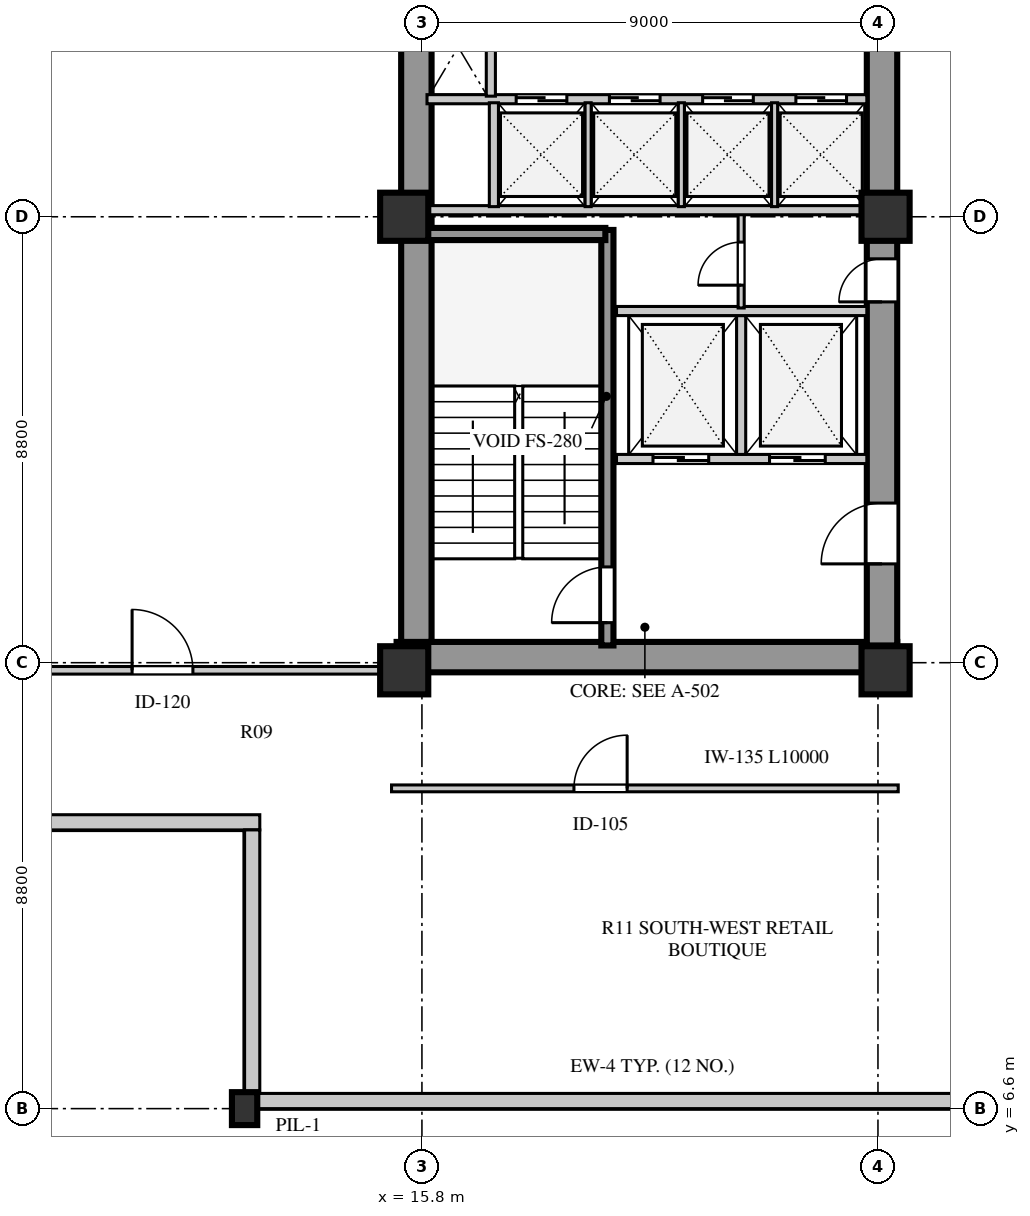
"""IFC4 building model, lengths in metres.
Left out: names, types, materials, properties, quantities, classifications, styles, units other than length and angle.
Written with IfcOpenShell. Run it as: python <this file> out.ifc"""

import sys

from ifc_helpers import new_model, si_unit, direction, frame, frame_2d, origin, origin_2d, place, context, subcontext, project, spatial, rectangle, extrude, element, fill, save


model = new_model("IFC4")
c1 = context("Model", 3, precision=1e-05, world=origin(), true_north=direction((0.0, 1.0)))
c2 = subcontext(c1, "Body", "Model", "MODEL_VIEW")
j1 = project(units=[si_unit("LENGTHUNIT", "METRE"), si_unit("PLANEANGLEUNIT", "RADIAN")], contexts=[c1])
p1 = place(None, origin())
s1 = spatial("IfcSite", under=j1, at=p1, CompositionType="ELEMENT")
p2 = place(p1, origin())
s2 = spatial("IfcBuilding", under=s1, at=p2, CompositionType="ELEMENT")
p3 = place(p2, frame((0.0, 0.0, 8.0)))
s3 = spatial("IfcBuildingStorey", under=s2, at=p3, CompositionType="ELEMENT", Elevation=8.0)
p4 = place(p3, frame((15.3, 15.51, 0.0), z_axis=(0.0, 0.0, 1.0), x_axis=(1.0, 0.0, 0.0)))
e1 = element("IfcWall", 1, at=p4, inside=s3, PredefinedType="SHEAR", context=c2, shape_type="SweptSolid", body=[
    extrude(rectangle(XDim=9.88, YDim=0.6, at=frame_2d((4.94, 0.0))), origin(), (0.0, 0.0, 1.0), 4.22),
])
p5 = place(p3, frame((15.69, 15.81, 0.0), z_axis=(0.0, 0.0, 1.0), x_axis=(0.0, 1.0, 0.0)))
e2 = element("IfcWall", 2, at=p5, inside=s3, PredefinedType="SHEAR", context=c2, shape_type="SweptSolid", body=[
    extrude(rectangle(XDim=25.63, YDim=0.6, at=frame_2d((12.815, 0.0))), origin(), (0.0, 0.0, 1.0), 4.22),
])
p6 = place(p3, frame((24.88, 15.74, 0.0), z_axis=(0.0, 0.0, 1.0), x_axis=(0.0, 1.0, 0.0)))
e3 = element("IfcWall", 3, at=p6, inside=s3, PredefinedType="SHEAR", context=c2, shape_type="SweptSolid", body=[
    extrude(rectangle(XDim=25.76, YDim=0.6, at=frame_2d((12.88, 0.0))), origin(), (0.0, 0.0, 1.0), 4.22),
])
p7 = place(p6, frame((1.61, 0.0, 0.0)))
e4 = element("IfcOpeningElement", 4, at=p7, cuts=e3, PredefinedType="OPENING", context=c2, shape_type="SweptSolid", body=[
    extrude(rectangle(XDim=1.2, YDim=2.1, at=frame_2d((0.6, 1.05))), frame((0.0, 0.31, 0.0), z_axis=(0.0, -1.0, 0.0), x_axis=(1.0, 0.0, 0.0)), (0.0, 0.0, 1.0), 0.62),
])
p8 = place(p6, frame((6.78, 0.0, 0.0)))
e5 = element("IfcOpeningElement", 5, at=p8, cuts=e3, PredefinedType="OPENING", context=c2, shape_type="SweptSolid", body=[
    extrude(rectangle(XDim=0.85, YDim=2.06, at=frame_2d((0.425, 1.03))), frame((0.0, 0.31, 0.0), z_axis=(0.0, -1.0, 0.0), x_axis=(1.0, 0.0, 0.0)), (0.0, 0.0, 1.0), 0.62),
])
p9 = place(p6, frame((12.11, 0.0, 0.0)))
e6 = element("IfcOpeningElement", 6, at=p9, cuts=e3, PredefinedType="OPENING", context=c2, shape_type="SweptSolid", body=[
    extrude(rectangle(XDim=1.5, YDim=2.12, at=frame_2d((0.75, 1.06))), frame((0.0, 0.31, 0.0), z_axis=(0.0, -1.0, 0.0), x_axis=(1.0, 0.0, 0.0)), (0.0, 0.0, 1.0), 0.62),
])
p10 = place(p6, frame((20.11, 0.0, 0.0)))
e7 = element("IfcOpeningElement", 7, at=p10, cuts=e3, PredefinedType="OPENING", context=c2, shape_type="SweptSolid", body=[
    extrude(rectangle(XDim=1.2, YDim=2.12, at=frame_2d((0.6, 1.06))), frame((0.0, 0.31, 0.0), z_axis=(0.0, -1.0, 0.0), x_axis=(1.0, 0.0, 0.0)), (0.0, 0.0, 1.0), 0.62),
])
p11 = place(p6, frame((24.01, 0.0, 0.0)))
e8 = element("IfcOpeningElement", 8, at=p11, cuts=e3, PredefinedType="OPENING", context=c2, shape_type="SweptSolid", body=[
    extrude(rectangle(XDim=0.95, YDim=2.1, at=frame_2d((0.475, 1.05))), frame((0.0, 0.31, 0.0), z_axis=(0.0, -1.0, 0.0), x_axis=(1.0, 0.0, 0.0)), (0.0, 0.0, 1.0), 0.62),
])
for number, where, z_axis, x_axis in (
    (9, (15.45, 15.25, 0.0), (0.0, 0.0, 1.0), (1.0, 0.0, 0.0)),
    (10, (15.45, 24.2, 0.0), (0.0, 0.0, 1.0), (1.0, 0.0, 0.0)),
    (11, (24.95, 15.25, 0.0), (0.0, 0.0, 1.0), (1.0, 0.0, 0.0)),
    (12, (24.95, 24.2, 0.0), (0.0, 0.0, 1.0), (1.0, 0.0, 0.0)),
):
    element("IfcColumn", number, at=place(p3, frame(where, z_axis=z_axis, x_axis=x_axis)), inside=s3, PredefinedType="COLUMN", context=c2, shape_type="SweptSolid", body=[
        extrude(rectangle(XDim=0.95, YDim=0.95, at=origin_2d()), origin(), (0.0, 0.0, 1.0), 4.22),
    ])
p12 = place(p3, frame((12.3, 6.6, 0.0), z_axis=(0.0, 0.0, 1.0), x_axis=(1.0, 0.0, 0.0)))
e13 = element("IfcColumn", 13, at=p12, inside=s3, PredefinedType="PILASTER", context=c2, shape_type="SweptSolid", body=[
    extrude(rectangle(XDim=0.5, YDim=0.65, at=origin_2d()), origin(), (0.0, 0.0, 1.0), 4.22),
])
p13 = place(p3, frame((12.3, 6.75, 0.0), z_axis=(0.0, 0.0, 1.0), x_axis=(1.0, 0.0, 0.0)))
e14 = element("IfcWall", 14, at=p13, inside=s3, PredefinedType="STANDARD", context=c2, shape_type="SweptSolid", body=[
    extrude(rectangle(XDim=34.0, YDim=0.3, at=frame_2d((17.0, 0.0))), origin(), (0.0, 0.0, 1.0), 4.22),
])
p14 = place(p13, frame((16.25, 0.0, 0.8)))
e15 = element("IfcOpeningElement", 15, at=p14, cuts=e14, PredefinedType="OPENING", context=c2, shape_type="SweptSolid", body=[
    extrude(rectangle(XDim=1.5, YDim=2.0, at=frame_2d((0.75, 1.0))), frame((0.0, 0.16, 0.0), z_axis=(0.0, -1.0, 0.0), x_axis=(1.0, 0.0, 0.0)), (0.0, 0.0, 1.0), 0.32),
])
p15 = place(p3, frame((6.8, 12.25, 0.0), z_axis=(0.0, 0.0, 1.0), x_axis=(1.0, 0.0, 0.0)))
e16 = element("IfcWall", 16, at=p15, inside=s3, PredefinedType="STANDARD", context=c2, shape_type="SweptSolid", body=[
    extrude(rectangle(XDim=5.8, YDim=0.3, at=frame_2d((2.9, 0.0))), origin(), (0.0, 0.0, 1.0), 4.22),
])
p16 = place(p3, frame((12.45, 12.1, 0.0), z_axis=(0.0, 0.0, 1.0), x_axis=(0.0, -1.0, 0.0)))
e17 = element("IfcWall", 17, at=p16, inside=s3, PredefinedType="STANDARD", context=c2, shape_type="SweptSolid", body=[
    extrude(rectangle(XDim=5.2, YDim=0.3, at=frame_2d((2.6, 0.0))), origin(), (0.0, 0.0, 1.0), 4.22),
])
p17 = place(p3, frame((19.46, 15.74, 0.0), z_axis=(0.0, 0.0, 1.0), x_axis=(0.0, 1.0, 0.0)))
e18 = element("IfcWall", 18, at=p17, inside=s3, PredefinedType="SHEAR", context=c2, shape_type="SweptSolid", body=[
    extrude(rectangle(XDim=8.2, YDim=0.24, at=frame_2d((4.1, 0.0))), origin(), (0.0, 0.0, 1.0), 4.5),
])
p18 = place(p17, frame((0.45, 0.0, 0.0)))
e19 = element("IfcOpeningElement", 19, at=p18, cuts=e18, PredefinedType="OPENING", context=c2, shape_type="SweptSolid", body=[
    extrude(rectangle(XDim=1.1, YDim=2.1, at=frame_2d((0.55, 1.05))), frame((0.0, 0.13, 0.0), z_axis=(0.0, -1.0, 0.0), x_axis=(1.0, 0.0, 0.0)), (0.0, 0.0, 1.0), 0.26),
])
p19 = place(p3, frame((15.9, 23.86, 0.0), z_axis=(0.0, 0.0, 1.0), x_axis=(1.0, 0.0, 0.0)))
e20 = element("IfcWall", 20, at=p19, inside=s3, PredefinedType="SHEAR", context=c2, shape_type="SweptSolid", body=[
    extrude(rectangle(XDim=3.52, YDim=0.24, at=frame_2d((1.76, 0.0))), origin(), (0.0, 0.0, 1.0), 4.5),
])
p20 = place(p3, frame((19.64, 19.42, 0.0), z_axis=(0.0, 0.0, 1.0), x_axis=(1.0, 0.0, 0.0)))
e21 = element("IfcWall", 21, at=p20, inside=s3, PredefinedType="SOLIDWALL", context=c2, shape_type="SweptSolid", body=[
    extrude(rectangle(XDim=4.94, YDim=0.18, at=frame_2d((2.47, 0.0))), origin(), (0.0, 0.0, 1.0), 4.22),
])
p21 = place(p20, frame((0.72, 0.0, 0.0)))
e22 = element("IfcOpeningElement", 22, at=p21, cuts=e21, PredefinedType="OPENING", context=c2, shape_type="SweptSolid", body=[
    extrude(rectangle(XDim=1.1, YDim=2.1, at=frame_2d((0.55, 1.05))), frame((0.0, 0.1, 0.0), z_axis=(0.0, -1.0, 0.0), x_axis=(1.0, 0.0, 0.0)), (0.0, 0.0, 1.0), 0.2),
])
p22 = place(p20, frame((3.02, 0.0, 0.0)))
e23 = element("IfcOpeningElement", 23, at=p22, cuts=e21, PredefinedType="OPENING", context=c2, shape_type="SweptSolid", body=[
    extrude(rectangle(XDim=1.1, YDim=2.1, at=frame_2d((0.55, 1.05))), frame((0.0, 0.1, 0.0), z_axis=(0.0, -1.0, 0.0), x_axis=(1.0, 0.0, 0.0)), (0.0, 0.0, 1.0), 0.2),
])
p23 = place(p3, frame((22.1, 19.51, 0.0), z_axis=(0.0, 0.0, 1.0), x_axis=(0.0, 1.0, 0.0)))
e24 = element("IfcWall", 24, at=p23, inside=s3, PredefinedType="SOLIDWALL", context=c2, shape_type="SweptSolid", body=[
    extrude(rectangle(XDim=2.74, YDim=0.18, at=frame_2d((1.37, 0.0))), origin(), (0.0, 0.0, 1.0), 4.22),
])
p24 = place(p3, frame((19.64, 22.34, 0.0), z_axis=(0.0, 0.0, 1.0), x_axis=(1.0, 0.0, 0.0)))
e25 = element("IfcWall", 25, at=p24, inside=s3, PredefinedType="SOLIDWALL", context=c2, shape_type="SweptSolid", body=[
    extrude(rectangle(XDim=4.94, YDim=0.18, at=frame_2d((2.47, 0.0))), origin(), (0.0, 0.0, 1.0), 4.22),
])
p25 = place(p3, frame((22.1, 22.4, 0.0), z_axis=(0.0, 0.0, 1.0), x_axis=(0.0, 1.0, 0.0)))
e26 = element("IfcWall", 26, at=p25, inside=s3, PredefinedType="PARTITIONING", context=c2, shape_type="SweptSolid", body=[
    extrude(rectangle(XDim=1.88, YDim=0.12, at=frame_2d((0.94, 0.0))), origin(), (0.0, 0.0, 1.0), 4.22),
])
p26 = place(p25, frame((0.45, 0.0, 0.0)))
e27 = element("IfcOpeningElement", 27, at=p26, cuts=e26, PredefinedType="OPENING", context=c2, shape_type="SweptSolid", body=[
    extrude(rectangle(XDim=0.85, YDim=2.06, at=frame_2d((0.425, 1.03))), frame((0.0, 0.07, 0.0), z_axis=(0.0, -1.0, 0.0), x_axis=(1.0, 0.0, 0.0)), (0.0, 0.0, 1.0), 0.14),
])
p27 = place(p3, frame((15.9, 26.52, 0.0), z_axis=(0.0, 0.0, 1.0), x_axis=(1.0, 0.0, 0.0)))
e28 = element("IfcWall", 28, at=p27, inside=s3, PredefinedType="SOLIDWALL", context=c2, shape_type="SweptSolid", body=[
    extrude(rectangle(XDim=8.68, YDim=0.18, at=frame_2d((4.34, 0.0))), origin(), (0.0, 0.0, 1.0), 4.22),
])
p28 = place(p27, frame((1.76, 0.0, 0.0)))
e29 = element("IfcOpeningElement", 29, at=p28, cuts=e28, PredefinedType="OPENING", context=c2, shape_type="SweptSolid", body=[
    extrude(rectangle(XDim=1.0, YDim=2.1, at=frame_2d((0.5, 1.05))), frame((0.0, 0.1, 0.0), z_axis=(0.0, -1.0, 0.0), x_axis=(1.0, 0.0, 0.0)), (0.0, 0.0, 1.0), 0.2),
])
p29 = place(p27, frame((3.6, 0.0, 0.0)))
e30 = element("IfcOpeningElement", 30, at=p29, cuts=e28, PredefinedType="OPENING", context=c2, shape_type="SweptSolid", body=[
    extrude(rectangle(XDim=1.0, YDim=2.1, at=frame_2d((0.5, 1.05))), frame((0.0, 0.1, 0.0), z_axis=(0.0, -1.0, 0.0), x_axis=(1.0, 0.0, 0.0)), (0.0, 0.0, 1.0), 0.2),
])
p30 = place(p27, frame((5.44, 0.0, 0.0)))
e31 = element("IfcOpeningElement", 31, at=p30, cuts=e28, PredefinedType="OPENING", context=c2, shape_type="SweptSolid", body=[
    extrude(rectangle(XDim=1.0, YDim=2.1, at=frame_2d((0.5, 1.05))), frame((0.0, 0.1, 0.0), z_axis=(0.0, -1.0, 0.0), x_axis=(1.0, 0.0, 0.0)), (0.0, 0.0, 1.0), 0.2),
])
p31 = place(p27, frame((7.28, 0.0, 0.0)))
e32 = element("IfcOpeningElement", 32, at=p31, cuts=e28, PredefinedType="OPENING", context=c2, shape_type="SweptSolid", body=[
    extrude(rectangle(XDim=1.0, YDim=2.1, at=frame_2d((0.5, 1.05))), frame((0.0, 0.1, 0.0), z_axis=(0.0, -1.0, 0.0), x_axis=(1.0, 0.0, 0.0)), (0.0, 0.0, 1.0), 0.2),
])
p32 = place(p3, frame((15.9, 24.33, 0.0), z_axis=(0.0, 0.0, 1.0), x_axis=(1.0, 0.0, 0.0)))
e33 = element("IfcWall", 33, at=p32, inside=s3, PredefinedType="SOLIDWALL", context=c2, shape_type="SweptSolid", body=[
    extrude(rectangle(XDim=8.68, YDim=0.18, at=frame_2d((4.34, 0.0))), origin(), (0.0, 0.0, 1.0), 3.42),
])
p33 = place(p3, frame((17.22, 24.4, 0.0), z_axis=(0.0, 0.0, 1.0), x_axis=(0.0, 1.0, 0.0)))
e34 = element("IfcWall", 34, at=p33, inside=s3, PredefinedType="SOLIDWALL", context=c2, shape_type="SweptSolid", body=[
    extrude(rectangle(XDim=2.05, YDim=0.18, at=frame_2d((1.025, 0.0))), origin(), (0.0, 0.0, 1.0), 4.22),
])
for number, where, z_axis, x_axis in (
    (35, (19.08, 24.4, 0.0), (0.0, 0.0, 1.0), (0.0, 1.0, 0.0)),
    (36, (20.92, 24.4, 0.0), (0.0, 0.0, 1.0), (0.0, 1.0, 0.0)),
    (37, (22.76, 24.4, 0.0), (0.0, 0.0, 1.0), (0.0, 1.0, 0.0)),
):
    element("IfcWall", number, at=place(p3, frame(where, z_axis=z_axis, x_axis=x_axis)), inside=s3, PredefinedType="PARTITIONING", context=c2, shape_type="SweptSolid", body=[
        extrude(rectangle(XDim=2.05, YDim=0.12, at=frame_2d((1.025, 0.0))), origin(), (0.0, 0.0, 1.0), 4.22),
    ])
p34 = place(p3, frame((17.16, 26.58, 0.0), z_axis=(0.0, 0.0, 1.0), x_axis=(0.0, 1.0, 0.0)))
e38 = element("IfcWall", 38, at=p34, inside=s3, PredefinedType="SOLIDWALL", context=c2, shape_type="SweptSolid", body=[
    extrude(rectangle(XDim=4.02, YDim=0.18, at=frame_2d((2.01, 0.0))), origin(), (0.0, 0.0, 1.0), 4.22),
])
p35 = place(p34, frame((2.35, 0.0, 0.0)))
e39 = element("IfcOpeningElement", 39, at=p35, cuts=e38, PredefinedType="OPENING", context=c2, shape_type="SweptSolid", body=[
    extrude(rectangle(XDim=0.85, YDim=2.06, at=frame_2d((0.425, 1.03))), frame((0.0, 0.1, 0.0), z_axis=(0.0, -1.0, 0.0), x_axis=(1.0, 0.0, 0.0)), (0.0, 0.0, 1.0), 0.2),
])
p36 = place(p3, frame((6.88, 15.25, 0.0), z_axis=(0.0, 0.0, 1.0), x_axis=(1.0, 0.0, 0.0)))
e40 = element("IfcWall", 40, at=p36, inside=s3, PredefinedType="PARTITIONING", context=c2, shape_type="SweptSolid", body=[
    extrude(rectangle(XDim=8.32, YDim=0.15, at=frame_2d((4.16, 0.0))), origin(), (0.0, 0.0, 1.0), 3.72),
])
p37 = place(p36, frame((3.2, 0.0, 0.0)))
e41 = element("IfcOpeningElement", 41, at=p37, cuts=e40, PredefinedType="OPENING", context=c2, shape_type="SweptSolid", body=[
    extrude(rectangle(XDim=1.2, YDim=2.1, at=frame_2d((0.6, 1.05))), frame((0.0, 0.085, 0.0), z_axis=(0.0, -1.0, 0.0), x_axis=(1.0, 0.0, 0.0)), (0.0, 0.0, 1.0), 0.17),
])
p38 = place(p3, frame((15.2, 12.92, 0.0), z_axis=(0.0, 0.0, 1.0), x_axis=(1.0, 0.0, 0.0)))
e42 = element("IfcWall", 42, at=p38, inside=s3, PredefinedType="PARTITIONING", context=c2, shape_type="SweptSolid", body=[
    extrude(rectangle(XDim=10.0, YDim=0.135, at=frame_2d((5.0, 0.0))), origin(), (0.0, 0.0, 1.0), 4.22),
])
p39 = place(p38, frame((3.6, 0.0, 0.0)))
e43 = element("IfcOpeningElement", 43, at=p39, cuts=e42, PredefinedType="OPENING", context=c2, shape_type="SweptSolid", body=[
    extrude(rectangle(XDim=1.05, YDim=2.1, at=frame_2d((0.525, 1.05))), frame((0.0, 0.078, 0.0), z_axis=(0.0, -1.0, 0.0), x_axis=(1.0, 0.0, 0.0)), (0.0, 0.0, 1.0), 0.155),
])
p40 = place(p18, origin())
e44 = element("IfcDoor", 44, at=p40, inside=s3, OperationType="SINGLE_SWING_LEFT", PredefinedType="DOOR", context=c2, shape_type="SweptSolid", body=[
    extrude(rectangle(XDim=1.1, YDim=2.1, at=frame_2d((0.55, 1.05))), frame((0.0, 0.025, 0.0), z_axis=(0.0, -1.0, 0.0), x_axis=(1.0, 0.0, 0.0)), (0.0, 0.0, 1.0), 0.05),
])
fill(e19, e44)
p41 = place(p21, origin())
e45 = element("IfcDoor", 45, at=p41, inside=s3, OperationType="DOUBLE_DOOR_SLIDING", PredefinedType="DOOR", context=c2, shape_type="SweptSolid", body=[
    extrude(rectangle(XDim=1.1, YDim=2.1, at=frame_2d((0.55, 1.05))), frame((0.0, 0.025, 0.0), z_axis=(0.0, -1.0, 0.0), x_axis=(1.0, 0.0, 0.0)), (0.0, 0.0, 1.0), 0.05),
])
fill(e22, e45)
p42 = place(p22, origin())
e46 = element("IfcDoor", 46, at=p42, inside=s3, OperationType="DOUBLE_DOOR_SLIDING", PredefinedType="DOOR", context=c2, shape_type="SweptSolid", body=[
    extrude(rectangle(XDim=1.1, YDim=2.1, at=frame_2d((0.55, 1.05))), frame((0.0, 0.025, 0.0), z_axis=(0.0, -1.0, 0.0), x_axis=(1.0, 0.0, 0.0)), (0.0, 0.0, 1.0), 0.05),
])
fill(e23, e46)
p43 = place(p7, frame((1.2, 0.0, 0.0), z_axis=(0.0, 0.0, 1.0), x_axis=(-1.0, 0.0, 0.0)))
e47 = element("IfcDoor", 47, at=p43, inside=s3, OperationType="SINGLE_SWING_RIGHT", PredefinedType="DOOR", context=c2, shape_type="SweptSolid", body=[
    extrude(rectangle(XDim=1.2, YDim=2.1, at=frame_2d((0.6, 1.05))), frame((0.0, 0.025, 0.0), z_axis=(0.0, -1.0, 0.0), x_axis=(1.0, 0.0, 0.0)), (0.0, 0.0, 1.0), 0.05),
])
fill(e4, e47)
p44 = place(p26, origin())
e48 = element("IfcDoor", 48, at=p44, inside=s3, OperationType="SINGLE_SWING_LEFT", PredefinedType="DOOR", context=c2, shape_type="SweptSolid", body=[
    extrude(rectangle(XDim=0.85, YDim=2.06, at=frame_2d((0.425, 1.03))), frame((0.0, 0.025, 0.0), z_axis=(0.0, -1.0, 0.0), x_axis=(1.0, 0.0, 0.0)), (0.0, 0.0, 1.0), 0.05),
])
fill(e27, e48)
p45 = place(p8, frame((0.85, 0.0, 0.0), z_axis=(0.0, 0.0, 1.0), x_axis=(-1.0, 0.0, 0.0)))
e49 = element("IfcDoor", 49, at=p45, inside=s3, OperationType="SINGLE_SWING_RIGHT", PredefinedType="DOOR", context=c2, shape_type="SweptSolid", body=[
    extrude(rectangle(XDim=0.85, YDim=2.06, at=frame_2d((0.425, 1.03))), frame((0.0, 0.025, 0.0), z_axis=(0.0, -1.0, 0.0), x_axis=(1.0, 0.0, 0.0)), (0.0, 0.0, 1.0), 0.05),
])
fill(e5, e49)
p46 = place(p28, origin())
e50 = element("IfcDoor", 50, at=p46, inside=s3, OperationType="DOUBLE_DOOR_SLIDING", PredefinedType="DOOR", context=c2, shape_type="SweptSolid", body=[
    extrude(rectangle(XDim=1.0, YDim=2.1, at=frame_2d((0.5, 1.05))), frame((0.0, 0.025, 0.0), z_axis=(0.0, -1.0, 0.0), x_axis=(1.0, 0.0, 0.0)), (0.0, 0.0, 1.0), 0.05),
])
fill(e29, e50)
p47 = place(p29, origin())
e51 = element("IfcDoor", 51, at=p47, inside=s3, OperationType="DOUBLE_DOOR_SLIDING", PredefinedType="DOOR", context=c2, shape_type="SweptSolid", body=[
    extrude(rectangle(XDim=1.0, YDim=2.1, at=frame_2d((0.5, 1.05))), frame((0.0, 0.025, 0.0), z_axis=(0.0, -1.0, 0.0), x_axis=(1.0, 0.0, 0.0)), (0.0, 0.0, 1.0), 0.05),
])
fill(e30, e51)
p48 = place(p30, origin())
e52 = element("IfcDoor", 52, at=p48, inside=s3, OperationType="DOUBLE_DOOR_SLIDING", PredefinedType="DOOR", context=c2, shape_type="SweptSolid", body=[
    extrude(rectangle(XDim=1.0, YDim=2.1, at=frame_2d((0.5, 1.05))), frame((0.0, 0.025, 0.0), z_axis=(0.0, -1.0, 0.0), x_axis=(1.0, 0.0, 0.0)), (0.0, 0.0, 1.0), 0.05),
])
fill(e31, e52)
p49 = place(p31, origin())
e53 = element("IfcDoor", 53, at=p49, inside=s3, OperationType="DOUBLE_DOOR_SLIDING", PredefinedType="DOOR", context=c2, shape_type="SweptSolid", body=[
    extrude(rectangle(XDim=1.0, YDim=2.1, at=frame_2d((0.5, 1.05))), frame((0.0, 0.025, 0.0), z_axis=(0.0, -1.0, 0.0), x_axis=(1.0, 0.0, 0.0)), (0.0, 0.0, 1.0), 0.05),
])
fill(e32, e53)
p50 = place(p37, origin())
e54 = element("IfcDoor", 54, at=p50, inside=s3, OperationType="SINGLE_SWING_LEFT", PredefinedType="DOOR", context=c2, shape_type="SweptSolid", body=[
    extrude(rectangle(XDim=1.2, YDim=2.1, at=frame_2d((0.6, 1.05))), frame((0.0, 0.025, 0.0), z_axis=(0.0, -1.0, 0.0), x_axis=(1.0, 0.0, 0.0)), (0.0, 0.0, 1.0), 0.05),
])
fill(e41, e54)
p51 = place(p39, frame((1.05, 0.0, 0.0), z_axis=(0.0, 0.0, 1.0), x_axis=(-1.0, 0.0, 0.0)))
e55 = element("IfcDoor", 55, at=p51, inside=s3, OperationType="SINGLE_SWING_LEFT", PredefinedType="DOOR", context=c2, shape_type="SweptSolid", body=[
    extrude(rectangle(XDim=1.05, YDim=2.1, at=frame_2d((0.525, 1.05))), frame((0.0, 0.025, 0.0), z_axis=(0.0, -1.0, 0.0), x_axis=(1.0, 0.0, 0.0)), (0.0, 0.0, 1.0), 0.05),
])
fill(e43, e55)
save(model, sys.argv[1])
